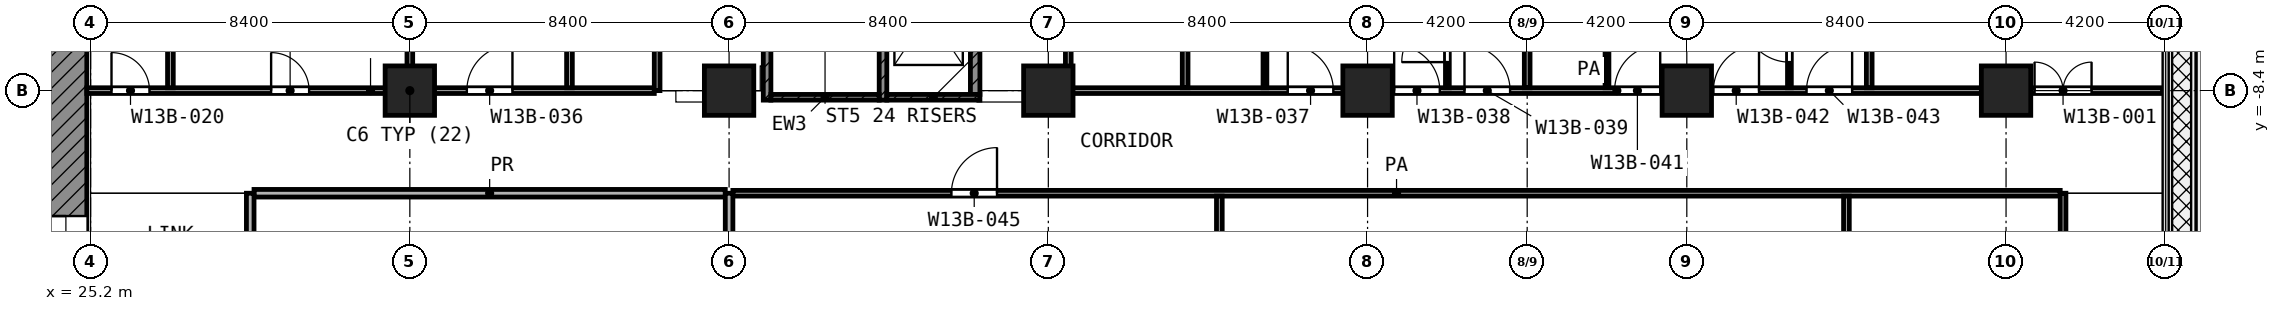
"""IFC4 building model, lengths in metres.
Left out: names, types, materials, properties, quantities, classifications, styles, units other than length and angle.
Written with IfcOpenShell. Run it as: python <this file> out.ifc"""

import sys

from ifc_helpers import new_model, si_unit, direction, frame, frame_2d, origin, origin_2d, place, context, subcontext, project, spatial, rectangle, extrude, element, fill, save


model = new_model("IFC4")
c1 = context("Model", 3, precision=1e-05, world=origin(), true_north=direction((0.0, 1.0)))
c2 = subcontext(c1, "Body", "Model", "MODEL_VIEW")
j1 = project(units=[si_unit("LENGTHUNIT", "METRE"), si_unit("PLANEANGLEUNIT", "RADIAN")], contexts=[c1])
p1 = place(None, origin())
s1 = spatial("IfcSite", under=j1, at=p1, CompositionType="ELEMENT")
p2 = place(p1, origin())
s2 = spatial("IfcBuilding", under=s1, at=p2, CompositionType="ELEMENT")
p3 = place(p2, frame((0.0, 0.0, 89.6)))
s3 = spatial("IfcBuildingStorey", under=s2, at=p3, CompositionType="ELEMENT", Elevation=89.6)
for number, where, z_axis, x_axis in (
    (1, (33.6, -8.4, 0.0), (0.0, 0.0, 1.0), (1.0, 0.0, 0.0)),
    (2, (42.0, -8.4, 0.0), (0.0, 0.0, 1.0), (1.0, 0.0, 0.0)),
    (3, (50.4, -8.4, 0.0), (0.0, 0.0, 1.0), (1.0, 0.0, 0.0)),
    (4, (58.8, -8.4, 0.0), (0.0, 0.0, 1.0), (1.0, 0.0, 0.0)),
    (5, (67.2, -8.4, 0.0), (0.0, 0.0, 1.0), (1.0, 0.0, 0.0)),
    (6, (75.6, -8.4, 0.0), (0.0, 0.0, 1.0), (1.0, 0.0, 0.0)),
):
    element("IfcColumn", number, at=place(p3, frame(where, z_axis=z_axis, x_axis=x_axis)), inside=s3, PredefinedType="COLUMN", context=c2, shape_type="SweptSolid", body=[
        extrude(rectangle(XDim=1.3, YDim=1.3, at=origin_2d()), origin(), (0.0, 0.0, 1.0), 4.2),
    ])
p4 = place(p3, frame((24.55, -24.0, 0.0), z_axis=(0.0, 0.0, 1.0), x_axis=(0.0, 1.0, 0.0)))
e7 = element("IfcWall", 7, at=p4, inside=s3, PredefinedType="SHEAR", context=c2, shape_type="SweptSolid", body=[
    extrude(rectangle(XDim=18.6, YDim=1.1, at=frame_2d((9.3, 0.0))), origin(), (0.0, 0.0, 1.0), 3.7),
])
p5 = place(p4, frame((10.5, 0.0, 0.0)))
e8 = element("IfcOpeningElement", 8, at=p5, cuts=e7, PredefinedType="OPENING", context=c2, shape_type="SweptSolid", body=[
    extrude(rectangle(XDim=1.8, YDim=2.1, at=frame_2d((0.9, 1.05))), frame((0.0, 0.56, 0.0), z_axis=(0.0, -1.0, 0.0), x_axis=(1.0, 0.0, 0.0)), (0.0, 0.0, 1.0), 1.12),
])
p6 = place(p3, frame((43.0, -8.65, 0.0), z_axis=(0.0, 0.0, 1.0), x_axis=(0.0, 1.0, 0.0)))
e9 = element("IfcWall", 9, at=p6, inside=s3, PredefinedType="SHEAR", context=c2, shape_type="SweptSolid", body=[
    extrude(rectangle(XDim=8.35, YDim=0.2, at=frame_2d((4.175, 0.0))), origin(), (0.0, 0.0, 1.0), 3.7),
])
p7 = place(p6, frame((7.0, 0.0, 0.0)))
e10 = element("IfcOpeningElement", 10, at=p7, cuts=e9, PredefinedType="OPENING", context=c2, shape_type="SweptSolid", body=[
    extrude(rectangle(XDim=1.1, YDim=2.1, at=frame_2d((0.55, 1.05))), frame((0.0, 0.11, 0.0), z_axis=(0.0, -1.0, 0.0), x_axis=(1.0, 0.0, 0.0)), (0.0, 0.0, 1.0), 0.22),
])
p8 = place(p3, frame((46.05, -8.65, 0.0), z_axis=(0.0, 0.0, 1.0), x_axis=(0.0, 1.0, 0.0)))
e11 = element("IfcWall", 11, at=p8, inside=s3, PredefinedType="SHEAR", context=c2, shape_type="SweptSolid", body=[
    extrude(rectangle(XDim=8.35, YDim=0.2, at=frame_2d((4.175, 0.0))), origin(), (0.0, 0.0, 1.0), 3.7),
])
p9 = place(p8, frame((7.0, 0.0, 0.0)))
e12 = element("IfcOpeningElement", 12, at=p9, cuts=e11, PredefinedType="OPENING", context=c2, shape_type="SweptSolid", body=[
    extrude(rectangle(XDim=1.1, YDim=2.1, at=frame_2d((0.55, 1.05))), frame((0.0, 0.11, 0.0), z_axis=(0.0, -1.0, 0.0), x_axis=(1.0, 0.0, 0.0)), (0.0, 0.0, 1.0), 0.22),
])
p10 = place(p3, frame((43.1, -8.575, 0.0), z_axis=(0.0, 0.0, 1.0), x_axis=(1.0, 0.0, 0.0)))
e13 = element("IfcWall", 13, at=p10, inside=s3, PredefinedType="SHEAR", context=c2, shape_type="SweptSolid", body=[
    extrude(rectangle(XDim=2.85, YDim=0.15, at=frame_2d((1.425, 0.0))), origin(), (0.0, 0.0, 1.0), 3.7),
])
p11 = place(p3, frame((46.15, -8.575, 0.0), z_axis=(0.0, 0.0, 1.0), x_axis=(1.0, 0.0, 0.0)))
e14 = element("IfcWall", 14, at=p11, inside=s3, PredefinedType="SHEAR", context=c2, shape_type="SweptSolid", body=[
    extrude(rectangle(XDim=2.45, YDim=0.15, at=frame_2d((1.225, 0.0))), origin(), (0.0, 0.0, 1.0), 3.7),
])
p12 = place(p3, frame((48.475, -8.5, 0.0), z_axis=(0.0, 0.0, 1.0), x_axis=(0.0, 1.0, 0.0)))
e15 = element("IfcWall", 15, at=p12, inside=s3, PredefinedType="SHEAR", context=c2, shape_type="SweptSolid", body=[
    extrude(rectangle(XDim=3.475, YDim=0.25, at=frame_2d((1.738, 0.0))), origin(), (0.0, 0.0, 1.0), 3.7),
])
p13 = place(p3, frame((56.1, -8.325, 0.0), z_axis=(0.0, 0.0, 1.0), x_axis=(0.0, 1.0, 0.0)))
e16 = element("IfcWall", 16, at=p13, inside=s3, PredefinedType="PARTITIONING", context=c2, shape_type="SweptSolid", body=[
    extrude(rectangle(XDim=2.625, YDim=0.1, at=frame_2d((1.312, 0.0))), origin(), (0.0, 0.0, 1.0), 3.7),
])
p14 = place(p3, frame((60.9, -8.325, 0.0), z_axis=(0.0, 0.0, 1.0), x_axis=(0.0, 1.0, 0.0)))
e17 = element("IfcWall", 17, at=p14, inside=s3, PredefinedType="PARTITIONING", context=c2, shape_type="SweptSolid", body=[
    extrude(rectangle(XDim=2.625, YDim=0.1, at=frame_2d((1.312, 0.0))), origin(), (0.0, 0.0, 1.0), 3.7),
])
p15 = place(p14, frame((0.675, 0.0, 0.0)))
e18 = element("IfcOpeningElement", 18, at=p15, cuts=e17, PredefinedType="OPENING", context=c2, shape_type="SweptSolid", body=[
    extrude(rectangle(XDim=1.2, YDim=2.1, at=frame_2d((0.6, 1.05))), frame((0.0, 0.06, 0.0), z_axis=(0.0, -1.0, 0.0), x_axis=(1.0, 0.0, 0.0)), (0.0, 0.0, 1.0), 0.12),
])
p16 = place(p3, frame((65.1, -8.325, 0.0), z_axis=(0.0, 0.0, 1.0), x_axis=(0.0, 1.0, 0.0)))
e19 = element("IfcWall", 19, at=p16, inside=s3, PredefinedType="PARTITIONING", context=c2, shape_type="SweptSolid", body=[
    extrude(rectangle(XDim=2.625, YDim=0.1, at=frame_2d((1.312, 0.0))), origin(), (0.0, 0.0, 1.0), 3.7),
])
p17 = place(p3, frame((69.9, -8.325, 0.0), z_axis=(0.0, 0.0, 1.0), x_axis=(0.0, 1.0, 0.0)))
e20 = element("IfcWall", 20, at=p17, inside=s3, PredefinedType="PARTITIONING", context=c2, shape_type="SweptSolid", body=[
    extrude(rectangle(XDim=2.625, YDim=0.1, at=frame_2d((1.312, 0.0))), origin(), (0.0, 0.0, 1.0), 3.7),
])
p18 = place(p17, frame((0.675, 0.0, 0.0)))
e21 = element("IfcOpeningElement", 21, at=p18, cuts=e20, PredefinedType="OPENING", context=c2, shape_type="SweptSolid", body=[
    extrude(rectangle(XDim=1.2, YDim=2.1, at=frame_2d((0.6, 1.05))), frame((0.0, 0.06, 0.0), z_axis=(0.0, -1.0, 0.0), x_axis=(1.0, 0.0, 0.0)), (0.0, 0.0, 1.0), 0.12),
])
p19 = place(p3, frame((42.1, -11.1, 0.0), z_axis=(0.0, 0.0, 1.0), x_axis=(1.0, 0.0, 0.0)))
e22 = element("IfcWall", 22, at=p19, inside=s3, PredefinedType="PARTITIONING", context=c2, shape_type="SweptSolid", body=[
    extrude(rectangle(XDim=34.925, YDim=0.15, at=frame_2d((17.462, 0.0))), origin(), (0.0, 0.0, 1.0), 3.7),
])
p20 = place(p19, frame((5.75, 0.0, 0.0)))
e23 = element("IfcOpeningElement", 23, at=p20, cuts=e22, PredefinedType="OPENING", context=c2, shape_type="SweptSolid", body=[
    extrude(rectangle(XDim=1.2, YDim=2.1, at=frame_2d((0.6, 1.05))), frame((0.0, 0.085, 0.0), z_axis=(0.0, -1.0, 0.0), x_axis=(1.0, 0.0, 0.0)), (0.0, 0.0, 1.0), 0.17),
])
p21 = place(p3, frame((25.1, -8.4, 0.0), z_axis=(0.0, 0.0, 1.0), x_axis=(1.0, 0.0, 0.0)))
e24 = element("IfcWall", 24, at=p21, inside=s3, PredefinedType="PARTITIONING", context=c2, shape_type="SweptSolid", body=[
    extrude(rectangle(XDim=14.932, YDim=0.15, at=frame_2d((7.466, 0.0))), origin(), (0.0, 0.0, 1.0), 3.7),
])
p22 = place(p21, frame((10.0, 0.0, 0.0)))
e25 = element("IfcOpeningElement", 25, at=p22, cuts=e24, PredefinedType="OPENING", context=c2, shape_type="SweptSolid", body=[
    extrude(rectangle(XDim=1.2, YDim=2.1, at=frame_2d((0.6, 1.05))), frame((0.0, 0.085, 0.0), z_axis=(0.0, -1.0, 0.0), x_axis=(1.0, 0.0, 0.0)), (0.0, 0.0, 1.0), 0.17),
])
p23 = place(p21, frame((0.65, 0.0, 0.0)))
e26 = element("IfcOpeningElement", 26, at=p23, cuts=e24, PredefinedType="OPENING", context=c2, shape_type="SweptSolid", body=[
    extrude(rectangle(XDim=1.0, YDim=2.1, at=frame_2d((0.5, 1.05))), frame((0.0, 0.085, 0.0), z_axis=(0.0, -1.0, 0.0), x_axis=(1.0, 0.0, 0.0)), (0.0, 0.0, 1.0), 0.17),
])
p24 = place(p21, frame((4.85, 0.0, 0.0)))
e27 = element("IfcOpeningElement", 27, at=p24, cuts=e24, PredefinedType="OPENING", context=c2, shape_type="SweptSolid", body=[
    extrude(rectangle(XDim=1.0, YDim=2.1, at=frame_2d((0.5, 1.05))), frame((0.0, 0.085, 0.0), z_axis=(0.0, -1.0, 0.0), x_axis=(1.0, 0.0, 0.0)), (0.0, 0.0, 1.0), 0.17),
])
p25 = place(p3, frame((51.0, -8.4, 0.0), z_axis=(0.0, 0.0, 1.0), x_axis=(1.0, 0.0, 0.0)))
e28 = element("IfcWall", 28, at=p25, inside=s3, PredefinedType="PARTITIONING", context=c2, shape_type="SweptSolid", body=[
    extrude(rectangle(XDim=28.72, YDim=0.15, at=frame_2d((14.36, 0.0))), origin(), (0.0, 0.0, 1.0), 3.7),
])
p26 = place(p25, frame((5.7, 0.0, 0.0)))
e29 = element("IfcOpeningElement", 29, at=p26, cuts=e28, PredefinedType="OPENING", context=c2, shape_type="SweptSolid", body=[
    extrude(rectangle(XDim=1.2, YDim=2.1, at=frame_2d((0.6, 1.05))), frame((0.0, 0.085, 0.0), z_axis=(0.0, -1.0, 0.0), x_axis=(1.0, 0.0, 0.0)), (0.0, 0.0, 1.0), 0.17),
])
p27 = place(p25, frame((8.5, 0.0, 0.0)))
e30 = element("IfcOpeningElement", 30, at=p27, cuts=e28, PredefinedType="OPENING", context=c2, shape_type="SweptSolid", body=[
    extrude(rectangle(XDim=1.2, YDim=2.1, at=frame_2d((0.6, 1.05))), frame((0.0, 0.085, 0.0), z_axis=(0.0, -1.0, 0.0), x_axis=(1.0, 0.0, 0.0)), (0.0, 0.0, 1.0), 0.17),
])
p28 = place(p25, frame((10.35, 0.0, 0.0)))
e31 = element("IfcOpeningElement", 31, at=p28, cuts=e28, PredefinedType="OPENING", context=c2, shape_type="SweptSolid", body=[
    extrude(rectangle(XDim=1.2, YDim=2.1, at=frame_2d((0.6, 1.05))), frame((0.0, 0.085, 0.0), z_axis=(0.0, -1.0, 0.0), x_axis=(1.0, 0.0, 0.0)), (0.0, 0.0, 1.0), 0.17),
])
p29 = place(p25, frame((14.3, 0.0, 0.0)))
e32 = element("IfcOpeningElement", 32, at=p29, cuts=e28, PredefinedType="OPENING", context=c2, shape_type="SweptSolid", body=[
    extrude(rectangle(XDim=1.2, YDim=2.1, at=frame_2d((0.6, 1.05))), frame((0.0, 0.085, 0.0), z_axis=(0.0, -1.0, 0.0), x_axis=(1.0, 0.0, 0.0)), (0.0, 0.0, 1.0), 0.17),
])
p30 = place(p25, frame((16.9, 0.0, 0.0)))
e33 = element("IfcOpeningElement", 33, at=p30, cuts=e28, PredefinedType="OPENING", context=c2, shape_type="SweptSolid", body=[
    extrude(rectangle(XDim=1.2, YDim=2.1, at=frame_2d((0.6, 1.05))), frame((0.0, 0.085, 0.0), z_axis=(0.0, -1.0, 0.0), x_axis=(1.0, 0.0, 0.0)), (0.0, 0.0, 1.0), 0.17),
])
p31 = place(p25, frame((19.35, 0.0, 0.0)))
e34 = element("IfcOpeningElement", 34, at=p31, cuts=e28, PredefinedType="OPENING", context=c2, shape_type="SweptSolid", body=[
    extrude(rectangle(XDim=1.2, YDim=2.1, at=frame_2d((0.6, 1.05))), frame((0.0, 0.085, 0.0), z_axis=(0.0, -1.0, 0.0), x_axis=(1.0, 0.0, 0.0)), (0.0, 0.0, 1.0), 0.17),
])
p32 = place(p25, frame((25.35, 0.0, 0.0)))
e35 = element("IfcOpeningElement", 35, at=p32, cuts=e28, PredefinedType="OPENING", context=c2, shape_type="SweptSolid", body=[
    extrude(rectangle(XDim=1.5, YDim=2.1, at=frame_2d((0.75, 1.05))), frame((0.0, 0.085, 0.0), z_axis=(0.0, -1.0, 0.0), x_axis=(1.0, 0.0, 0.0)), (0.0, 0.0, 1.0), 0.17),
])
for number, where, z_axis, x_axis in (
    (36, (27.3, -8.325, 0.0), (0.0, 0.0, 1.0), (0.0, 1.0, 0.0)),
    (37, (33.6, -8.325, 0.0), (0.0, 0.0, 1.0), (0.0, 1.0, 0.0)),
    (38, (37.8, -8.325, 0.0), (0.0, 0.0, 1.0), (0.0, 1.0, 0.0)),
):
    element("IfcWall", number, at=place(p3, frame(where, z_axis=z_axis, x_axis=x_axis)), inside=s3, PredefinedType="PARTITIONING", context=c2, shape_type="SweptSolid", body=[
        extrude(rectangle(XDim=8.245, YDim=0.15, at=frame_2d((4.123, 0.0))), origin(), (0.0, 0.0, 1.0), 3.7),
    ])
p33 = place(p3, frame((40.107, -8.4, 0.0), z_axis=(0.0, 0.0, 1.0), x_axis=(0.0, 1.0, 0.0)))
e39 = element("IfcWall", 39, at=p33, inside=s3, PredefinedType="PARTITIONING", context=c2, shape_type="SweptSolid", body=[
    extrude(rectangle(XDim=8.048, YDim=0.15, at=frame_2d((4.024, 0.0))), origin(), (0.0, 0.0, 1.0), 3.7),
])
p34 = place(p33, frame((3.524, 0.0, 0.0)))
e40 = element("IfcOpeningElement", 40, at=p34, cuts=e39, PredefinedType="OPENING", context=c2, shape_type="SweptSolid", body=[
    extrude(rectangle(XDim=1.0, YDim=2.1, at=frame_2d((0.5, 1.05))), frame((0.0, 0.085, 0.0), z_axis=(0.0, -1.0, 0.0), x_axis=(1.0, 0.0, 0.0)), (0.0, 0.0, 1.0), 0.17),
])
p35 = place(p3, frame((50.925, -8.4, 0.0), z_axis=(0.0, 0.0, 1.0), x_axis=(0.0, 1.0, 0.0)))
e41 = element("IfcWall", 41, at=p35, inside=s3, PredefinedType="PARTITIONING", context=c2, shape_type="SweptSolid", body=[
    extrude(rectangle(XDim=6.548, YDim=0.15, at=frame_2d((3.274, 0.0))), origin(), (0.0, 0.0, 1.0), 3.7),
])
p36 = place(p35, frame((2.774, 0.0, 0.0)))
e42 = element("IfcOpeningElement", 42, at=p36, cuts=e41, PredefinedType="OPENING", context=c2, shape_type="SweptSolid", body=[
    extrude(rectangle(XDim=1.0, YDim=2.1, at=frame_2d((0.5, 1.05))), frame((0.0, 0.085, 0.0), z_axis=(0.0, -1.0, 0.0), x_axis=(1.0, 0.0, 0.0)), (0.0, 0.0, 1.0), 0.17),
])
p37 = place(p3, frame((54.0, -8.325, 0.0), z_axis=(0.0, 0.0, 1.0), x_axis=(0.0, 1.0, 0.0)))
e43 = element("IfcWall", 43, at=p37, inside=s3, PredefinedType="PARTITIONING", context=c2, shape_type="SweptSolid", body=[
    extrude(rectangle(XDim=8.245, YDim=0.15, at=frame_2d((4.123, 0.0))), origin(), (0.0, 0.0, 1.0), 3.7),
])
p38 = place(p3, frame((54.9, -14.025, 0.0), z_axis=(0.0, 0.0, 1.0), x_axis=(0.0, 1.0, 0.0)))
e44 = element("IfcWall", 44, at=p38, inside=s3, PredefinedType="PARTITIONING", context=c2, shape_type="SweptSolid", body=[
    extrude(rectangle(XDim=2.85, YDim=0.15, at=frame_2d((1.425, 0.0))), origin(), (0.0, 0.0, 1.0), 3.7),
])
p39 = place(p3, frame((63.0, -8.325, 0.0), z_axis=(0.0, 0.0, 1.0), x_axis=(0.0, 1.0, 0.0)))
e45 = element("IfcWall", 45, at=p39, inside=s3, PredefinedType="PARTITIONING", context=c2, shape_type="SweptSolid", body=[
    extrude(rectangle(XDim=8.245, YDim=0.15, at=frame_2d((4.123, 0.0))), origin(), (0.0, 0.0, 1.0), 3.7),
])
p40 = place(p3, frame((71.4, -14.025, 0.0), z_axis=(0.0, 0.0, 1.0), x_axis=(0.0, 1.0, 0.0)))
e46 = element("IfcWall", 46, at=p40, inside=s3, PredefinedType="PARTITIONING", context=c2, shape_type="SweptSolid", body=[
    extrude(rectangle(XDim=2.85, YDim=0.15, at=frame_2d((1.425, 0.0))), origin(), (0.0, 0.0, 1.0), 3.7),
])
p41 = place(p3, frame((72.0, -8.325, 0.0), z_axis=(0.0, 0.0, 1.0), x_axis=(0.0, 1.0, 0.0)))
e47 = element("IfcWall", 47, at=p41, inside=s3, PredefinedType="PARTITIONING", context=c2, shape_type="SweptSolid", body=[
    extrude(rectangle(XDim=8.245, YDim=0.15, at=frame_2d((4.123, 0.0))), origin(), (0.0, 0.0, 1.0), 3.7),
])
p42 = place(p3, frame((77.1, -14.1, 0.0), z_axis=(0.0, 0.0, 1.0), x_axis=(0.0, 1.0, 0.0)))
e48 = element("IfcWall", 48, at=p42, inside=s3, PredefinedType="PARTITIONING", context=c2, shape_type="SweptSolid", body=[
    extrude(rectangle(XDim=3.0, YDim=0.15, at=frame_2d((1.5, 0.0))), origin(), (0.0, 0.0, 1.0), 3.7),
])
p43 = place(p3, frame((29.5, -11.1, 0.0), z_axis=(0.0, 0.0, 1.0), x_axis=(1.0, 0.0, 0.0)))
e49 = element("IfcWall", 49, at=p43, inside=s3, PredefinedType="PARTITIONING", context=c2, shape_type="SweptSolid", body=[
    extrude(rectangle(XDim=12.4, YDim=0.2, at=frame_2d((6.2, 0.0))), origin(), (0.0, 0.0, 1.0), 3.7),
])
for number, where, z_axis, x_axis in (
    (50, (29.4, -14.1, 0.0), (0.0, 0.0, 1.0), (0.0, 1.0, 0.0)),
    (51, (42.0, -14.1, 0.0), (0.0, 0.0, 1.0), (0.0, 1.0, 0.0)),
):
    element("IfcWall", number, at=place(p3, frame(where, z_axis=z_axis, x_axis=x_axis)), inside=s3, PredefinedType="PARTITIONING", context=c2, shape_type="SweptSolid", body=[
        extrude(rectangle(XDim=3.0, YDim=0.2, at=frame_2d((1.5, 0.0))), origin(), (0.0, 0.0, 1.0), 3.7),
    ])
p44 = place(p5, origin())
e52 = element("IfcDoor", 52, at=p44, inside=s3, OperationType="DOUBLE_DOOR_SINGLE_SWING", PredefinedType="DOOR", context=c2, shape_type="SweptSolid", body=[
    extrude(rectangle(XDim=1.8, YDim=2.1, at=frame_2d((0.9, 1.05))), frame((0.0, 0.025, 0.0), z_axis=(0.0, -1.0, 0.0), x_axis=(1.0, 0.0, 0.0)), (0.0, 0.0, 1.0), 0.05),
])
fill(e8, e52)
p45 = place(p22, origin())
e53 = element("IfcDoor", 53, at=p45, inside=s3, OperationType="SINGLE_SWING_RIGHT", PredefinedType="DOOR", context=c2, shape_type="SweptSolid", body=[
    extrude(rectangle(XDim=1.2, YDim=2.1, at=frame_2d((0.6, 1.05))), frame((0.0, 0.025, 0.0), z_axis=(0.0, -1.0, 0.0), x_axis=(1.0, 0.0, 0.0)), (0.0, 0.0, 1.0), 0.05),
])
fill(e25, e53)
p46 = place(p26, origin())
e54 = element("IfcDoor", 54, at=p46, inside=s3, OperationType="SINGLE_SWING_LEFT", PredefinedType="DOOR", context=c2, shape_type="SweptSolid", body=[
    extrude(rectangle(XDim=1.2, YDim=2.1, at=frame_2d((0.6, 1.05))), frame((0.0, 0.025, 0.0), z_axis=(0.0, -1.0, 0.0), x_axis=(1.0, 0.0, 0.0)), (0.0, 0.0, 1.0), 0.05),
])
fill(e29, e54)
p47 = place(p27, origin())
e55 = element("IfcDoor", 55, at=p47, inside=s3, OperationType="SINGLE_SWING_LEFT", PredefinedType="DOOR", context=c2, shape_type="SweptSolid", body=[
    extrude(rectangle(XDim=1.2, YDim=2.1, at=frame_2d((0.6, 1.05))), frame((0.0, 0.025, 0.0), z_axis=(0.0, -1.0, 0.0), x_axis=(1.0, 0.0, 0.0)), (0.0, 0.0, 1.0), 0.05),
])
fill(e30, e55)
p48 = place(p28, origin())
e56 = element("IfcDoor", 56, at=p48, inside=s3, OperationType="SINGLE_SWING_LEFT", PredefinedType="DOOR", context=c2, shape_type="SweptSolid", body=[
    extrude(rectangle(XDim=1.2, YDim=2.1, at=frame_2d((0.6, 1.05))), frame((0.0, 0.025, 0.0), z_axis=(0.0, -1.0, 0.0), x_axis=(1.0, 0.0, 0.0)), (0.0, 0.0, 1.0), 0.05),
])
fill(e31, e56)
p49 = place(p15, origin())
e57 = element("IfcDoor", 57, at=p49, inside=s3, OperationType="SINGLE_SWING_LEFT", PredefinedType="DOOR", context=c2, shape_type="SweptSolid", body=[
    extrude(rectangle(XDim=1.2, YDim=2.1, at=frame_2d((0.6, 1.05))), frame((0.0, 0.025, 0.0), z_axis=(0.0, -1.0, 0.0), x_axis=(1.0, 0.0, 0.0)), (0.0, 0.0, 1.0), 0.05),
])
fill(e18, e57)
p50 = place(p29, origin())
e58 = element("IfcDoor", 58, at=p50, inside=s3, OperationType="SINGLE_SWING_RIGHT", PredefinedType="DOOR", context=c2, shape_type="SweptSolid", body=[
    extrude(rectangle(XDim=1.2, YDim=2.1, at=frame_2d((0.6, 1.05))), frame((0.0, 0.025, 0.0), z_axis=(0.0, -1.0, 0.0), x_axis=(1.0, 0.0, 0.0)), (0.0, 0.0, 1.0), 0.05),
])
fill(e32, e58)
p51 = place(p30, origin())
e59 = element("IfcDoor", 59, at=p51, inside=s3, OperationType="SINGLE_SWING_RIGHT", PredefinedType="DOOR", context=c2, shape_type="SweptSolid", body=[
    extrude(rectangle(XDim=1.2, YDim=2.1, at=frame_2d((0.6, 1.05))), frame((0.0, 0.025, 0.0), z_axis=(0.0, -1.0, 0.0), x_axis=(1.0, 0.0, 0.0)), (0.0, 0.0, 1.0), 0.05),
])
fill(e33, e59)
p52 = place(p31, origin())
e60 = element("IfcDoor", 60, at=p52, inside=s3, OperationType="SINGLE_SWING_RIGHT", PredefinedType="DOOR", context=c2, shape_type="SweptSolid", body=[
    extrude(rectangle(XDim=1.2, YDim=2.1, at=frame_2d((0.6, 1.05))), frame((0.0, 0.025, 0.0), z_axis=(0.0, -1.0, 0.0), x_axis=(1.0, 0.0, 0.0)), (0.0, 0.0, 1.0), 0.05),
])
fill(e34, e60)
p53 = place(p18, origin())
e61 = element("IfcDoor", 61, at=p53, inside=s3, OperationType="SINGLE_SWING_RIGHT", PredefinedType="DOOR", context=c2, shape_type="SweptSolid", body=[
    extrude(rectangle(XDim=1.2, YDim=2.1, at=frame_2d((0.6, 1.05))), frame((0.0, 0.025, 0.0), z_axis=(0.0, -1.0, 0.0), x_axis=(1.0, 0.0, 0.0)), (0.0, 0.0, 1.0), 0.05),
])
fill(e21, e61)
p54 = place(p32, origin())
e62 = element("IfcDoor", 62, at=p54, inside=s3, OperationType="DOUBLE_DOOR_SINGLE_SWING", PredefinedType="DOOR", context=c2, shape_type="SweptSolid", body=[
    extrude(rectangle(XDim=1.5, YDim=2.1, at=frame_2d((0.75, 1.05))), frame((0.0, 0.025, 0.0), z_axis=(0.0, -1.0, 0.0), x_axis=(1.0, 0.0, 0.0)), (0.0, 0.0, 1.0), 0.05),
])
fill(e35, e62)
p55 = place(p20, origin())
e63 = element("IfcDoor", 63, at=p55, inside=s3, OperationType="SINGLE_SWING_RIGHT", PredefinedType="DOOR", context=c2, shape_type="SweptSolid", body=[
    extrude(rectangle(XDim=1.2, YDim=2.1, at=frame_2d((0.6, 1.05))), frame((0.0, 0.025, 0.0), z_axis=(0.0, -1.0, 0.0), x_axis=(1.0, 0.0, 0.0)), (0.0, 0.0, 1.0), 0.05),
])
fill(e23, e63)
p56 = place(p23, origin())
e64 = element("IfcDoor", 64, at=p56, inside=s3, OperationType="SINGLE_SWING_LEFT", PredefinedType="DOOR", context=c2, shape_type="SweptSolid", body=[
    extrude(rectangle(XDim=1.0, YDim=2.1, at=frame_2d((0.5, 1.05))), frame((0.0, 0.025, 0.0), z_axis=(0.0, -1.0, 0.0), x_axis=(1.0, 0.0, 0.0)), (0.0, 0.0, 1.0), 0.05),
])
fill(e26, e64)
p57 = place(p24, origin())
e65 = element("IfcDoor", 65, at=p57, inside=s3, OperationType="SINGLE_SWING_LEFT", PredefinedType="DOOR", context=c2, shape_type="SweptSolid", body=[
    extrude(rectangle(XDim=1.0, YDim=2.1, at=frame_2d((0.5, 1.05))), frame((0.0, 0.025, 0.0), z_axis=(0.0, -1.0, 0.0), x_axis=(1.0, 0.0, 0.0)), (0.0, 0.0, 1.0), 0.05),
])
fill(e27, e65)
save(model, sys.argv[1])
